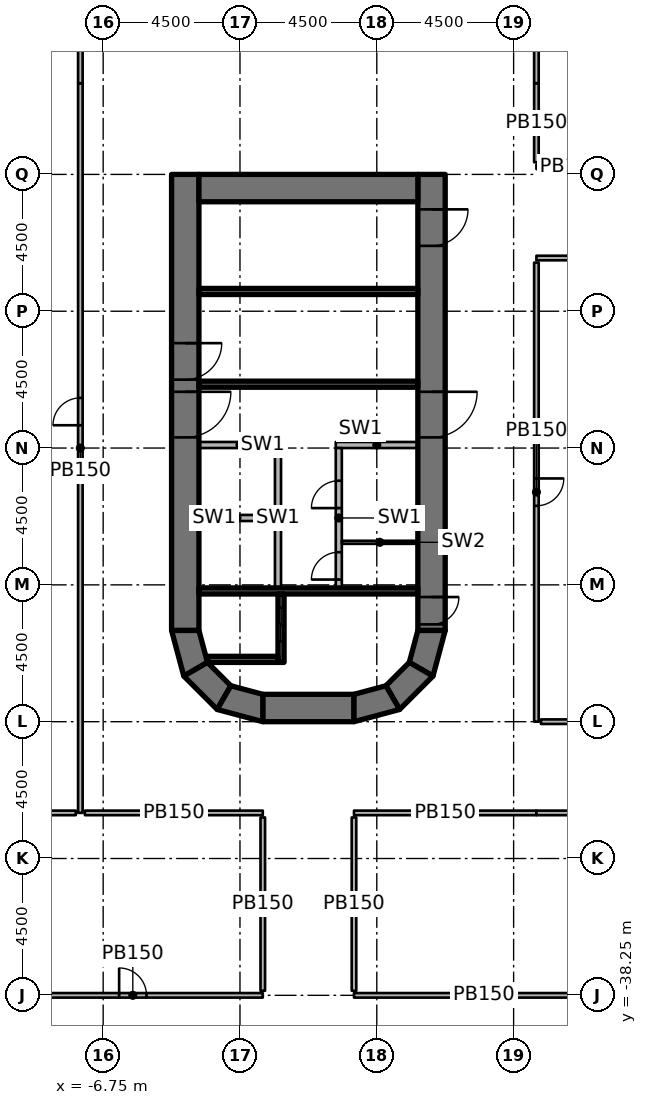
"""IFC4 building model, lengths in metres.
Left out: names, types, materials, properties, quantities, classifications, styles, units other than length and angle.
Written with IfcOpenShell. Run it as: python <this file> out.ifc"""

import sys

from ifc_helpers import new_model, si_unit, direction, frame, frame_2d, origin, origin_2d, place, context, subcontext, project, spatial, polyline, rectangle, outline, extrude, element, fill, save


model = new_model("IFC4")
c1 = context("Model", 3, precision=1e-05, world=origin(), true_north=direction((0.0, 1.0)))
c2 = subcontext(c1, "Body", "Model", "MODEL_VIEW")
j1 = project(units=[si_unit("LENGTHUNIT", "METRE"), si_unit("PLANEANGLEUNIT", "RADIAN")], contexts=[c1])
p1 = place(None, origin())
s1 = spatial("IfcSite", under=j1, at=p1, CompositionType="ELEMENT")
p2 = place(p1, origin())
s2 = spatial("IfcBuilding", under=s1, at=p2, CompositionType="ELEMENT")
p3 = place(p2, frame((0.0, 0.0, 7.0)))
s3 = spatial("IfcBuildingStorey", under=s2, at=p3, CompositionType="ELEMENT", Elevation=7.0)
for number, where, z_axis, x_axis in (
    (1, (-6.25, -26.9, 0.0), (0.0, 0.0, 1.0), (1.0, 0.0, 0.0)),
    (2, (-6.25, -24.65, 0.0), (0.0, 0.0, 1.0), (1.0, 0.0, 0.0)),
    (3, (-6.25, -20.25, 0.0), (0.0, 0.0, 1.0), (1.0, 0.0, 0.0)),
    (4, (-6.25, -15.75, 0.0), (0.0, 0.0, 1.0), (1.0, 0.0, 0.0)),
    (5, (-6.25, -10.75, 0.0), (0.0, 0.0, 1.0), (1.0, 0.0, 0.0)),
    (6, (-2.25, -33.11, 0.0), (0.0, 0.0, 1.0), (1.0, 0.0, 0.0)),
    (7, (2.25, -33.11, 0.0), (0.0, 0.0, 1.0), (1.0, 0.0, 0.0)),
    (8, (6.25, -26.9, 0.0), (0.0, 0.0, 1.0), (1.0, 0.0, 0.0)),
    (9, (6.25, -24.65, 0.0), (0.0, 0.0, 1.0), (1.0, 0.0, 0.0)),
    (10, (6.25, -20.25, 0.0), (0.0, 0.0, 1.0), (1.0, 0.0, 0.0)),
    (11, (6.25, -15.75, 0.0), (0.0, 0.0, 1.0), (1.0, 0.0, 0.0)),
    (12, (6.25, -10.75, 0.0), (0.0, 0.0, 1.0), (1.0, 0.0, 0.0)),
):
    element("IfcColumn", number, at=place(p3, frame(where, z_axis=z_axis, x_axis=x_axis)), inside=s3, PredefinedType="COLUMN", context=c2, shape_type="SweptSolid", body=[
        extrude(rectangle(XDim=1.2, YDim=1.2, at=origin_2d()), origin(), (0.0, 0.0, 1.0), 4.55),
    ])
p4 = place(p3, frame((-4.05, -11.25, 0.0), z_axis=(0.0, 0.0, 1.0), x_axis=(0.0, -1.0, 0.0)))
e13 = element("IfcWall", 13, at=p4, inside=s3, PredefinedType="SHEAR", context=c2, shape_type="SweptSolid", body=[
    extrude(rectangle(XDim=15.0, YDim=0.9, at=frame_2d((7.5, 0.0))), origin(), (0.0, 0.0, 1.0), 5.0),
])
p5 = place(p4, frame((7.15, 0.0, 0.0)))
e14 = element("IfcOpeningElement", 14, at=p5, cuts=e13, PredefinedType="OPENING", context=c2, shape_type="SweptSolid", body=[
    extrude(rectangle(XDim=1.5, YDim=2.3, at=frame_2d((0.75, 1.15))), frame((0.0, 0.46, 0.0), z_axis=(0.0, -1.0, 0.0), x_axis=(1.0, 0.0, 0.0)), (0.0, 0.0, 1.0), 0.92),
])
p6 = place(p4, frame((5.55, 0.0, 0.0)))
e15 = element("IfcOpeningElement", 15, at=p6, cuts=e13, PredefinedType="OPENING", context=c2, shape_type="SweptSolid", body=[
    extrude(rectangle(XDim=1.2, YDim=2.1, at=frame_2d((0.6, 1.05))), frame((0.0, 0.46, 0.0), z_axis=(0.0, -1.0, 0.0), x_axis=(1.0, 0.0, 0.0)), (0.0, 0.0, 1.0), 0.92),
])
p7 = place(p3, frame((4.05, -11.25, 0.0), z_axis=(0.0, 0.0, 1.0), x_axis=(0.0, -1.0, 0.0)))
e16 = element("IfcWall", 16, at=p7, inside=s3, PredefinedType="SHEAR", context=c2, shape_type="SweptSolid", body=[
    extrude(rectangle(XDim=15.0, YDim=0.9, at=frame_2d((7.5, 0.0))), origin(), (0.0, 0.0, 1.0), 5.0),
])
p8 = place(p7, frame((7.15, 0.0, 0.0)))
e17 = element("IfcOpeningElement", 17, at=p8, cuts=e16, PredefinedType="OPENING", context=c2, shape_type="SweptSolid", body=[
    extrude(rectangle(XDim=1.5, YDim=2.3, at=frame_2d((0.75, 1.15))), frame((0.0, 0.46, 0.0), z_axis=(0.0, -1.0, 0.0), x_axis=(1.0, 0.0, 0.0)), (0.0, 0.0, 1.0), 0.92),
])
p9 = place(p7, frame((13.9, 0.0, 0.0)))
e18 = element("IfcOpeningElement", 18, at=p9, cuts=e16, PredefinedType="OPENING", context=c2, shape_type="SweptSolid", body=[
    extrude(rectangle(XDim=0.9, YDim=2.1, at=frame_2d((0.45, 1.05))), frame((0.0, 0.46, 0.0), z_axis=(0.0, -1.0, 0.0), x_axis=(1.0, 0.0, 0.0)), (0.0, 0.0, 1.0), 0.92),
])
p10 = place(p7, frame((1.15, 0.0, 0.0)))
e19 = element("IfcOpeningElement", 19, at=p10, cuts=e16, PredefinedType="OPENING", context=c2, shape_type="SweptSolid", body=[
    extrude(rectangle(XDim=1.2, YDim=2.1, at=frame_2d((0.6, 1.05))), frame((0.0, 0.46, 0.0), z_axis=(0.0, -1.0, 0.0), x_axis=(1.0, 0.0, 0.0)), (0.0, 0.0, 1.0), 0.92),
])
p11 = place(p3, frame((-3.6, -11.7, 0.0), z_axis=(0.0, 0.0, 1.0), x_axis=(1.0, 0.0, 0.0)))
e20 = element("IfcWall", 20, at=p11, inside=s3, PredefinedType="SHEAR", context=c2, shape_type="SweptSolid", body=[
    extrude(rectangle(XDim=7.2, YDim=0.9, at=frame_2d((3.6, 0.0))), origin(), (0.0, 0.0, 1.0), 5.0),
])
p12 = place(p3, frame((-1.5, -28.8, 0.0), z_axis=(0.0, 0.0, 1.0), x_axis=(1.0, 0.0, 0.0)))
e21 = element("IfcWall", 21, at=p12, inside=s3, PredefinedType="SHEAR", context=c2, shape_type="SweptSolid", body=[
    extrude(rectangle(XDim=3.0, YDim=0.9, at=frame_2d((1.5, 0.0))), origin(), (0.0, 0.0, 1.0), 5.0),
])
p13 = place(p3, origin())
e22 = element("IfcWall", 22, at=p13, inside=s3, PredefinedType="SHEAR", context=c2, shape_type="SweptSolid", body=[
    extrude(outline(polyline([(-4.5, -26.25), (-4.098, -27.75), (-3.319, -27.3), (-3.6, -26.25), (-4.5, -26.25)])), origin(), (0.0, 0.0, 1.0), 5.0),
])
p14 = place(p3, origin())
e23 = element("IfcWall", 23, at=p14, inside=s3, PredefinedType="SHEAR", context=c2, shape_type="SweptSolid", body=[
    extrude(outline(polyline([(-4.098, -27.75), (-3.0, -28.848), (-2.55, -28.069), (-3.319, -27.3), (-4.098, -27.75)])), origin(), (0.0, 0.0, 1.0), 5.0),
])
p15 = place(p3, origin())
e24 = element("IfcWall", 24, at=p15, inside=s3, PredefinedType="SHEAR", context=c2, shape_type="SweptSolid", body=[
    extrude(outline(polyline([(-3.0, -28.848), (-1.5, -29.25), (-1.5, -28.35), (-2.55, -28.069), (-3.0, -28.848)])), origin(), (0.0, 0.0, 1.0), 5.0),
])
p16 = place(p3, origin())
e25 = element("IfcWall", 25, at=p16, inside=s3, PredefinedType="SHEAR", context=c2, shape_type="SweptSolid", body=[
    extrude(outline(polyline([(4.5, -26.25), (4.098, -27.75), (3.319, -27.3), (3.6, -26.25), (4.5, -26.25)])), origin(), (0.0, 0.0, 1.0), 5.0),
])
p17 = place(p3, origin())
e26 = element("IfcWall", 26, at=p17, inside=s3, PredefinedType="SHEAR", context=c2, shape_type="SweptSolid", body=[
    extrude(outline(polyline([(4.098, -27.75), (3.0, -28.848), (2.55, -28.069), (3.319, -27.3), (4.098, -27.75)])), origin(), (0.0, 0.0, 1.0), 5.0),
])
p18 = place(p3, origin())
e27 = element("IfcWall", 27, at=p18, inside=s3, PredefinedType="SHEAR", context=c2, shape_type="SweptSolid", body=[
    extrude(outline(polyline([(3.0, -28.848), (1.5, -29.25), (1.5, -28.35), (2.55, -28.069), (3.0, -28.848)])), origin(), (0.0, 0.0, 1.0), 5.0),
])
p19 = place(p3, frame((3.6, -24.95, 0.0), z_axis=(0.0, 0.0, 1.0), x_axis=(-1.0, 0.0, 0.0)))
e28 = element("IfcWall", 28, at=p19, inside=s3, PredefinedType="SHEAR", context=c2, shape_type="SweptSolid", body=[
    extrude(rectangle(XDim=7.2, YDim=0.2, at=frame_2d((3.6, 0.0))), origin(), (0.0, 0.0, 1.0), 4.55),
])
p20 = place(p3, frame((-0.9, -27.3, 0.0), z_axis=(0.0, 0.0, 1.0), x_axis=(0.0, 1.0, 0.0)))
e29 = element("IfcWall", 29, at=p20, inside=s3, PredefinedType="SHEAR", context=c2, shape_type="SweptSolid", body=[
    extrude(rectangle(XDim=2.25, YDim=0.2, at=frame_2d((1.125, 0.0))), origin(), (0.0, 0.0, 1.0), 4.55),
])
p21 = place(p20, frame((0.7, 0.0, 0.0)))
e30 = element("IfcOpeningElement", 30, at=p21, cuts=e29, PredefinedType="OPENING", context=c2, shape_type="SweptSolid", body=[
    extrude(rectangle(XDim=1.1, YDim=2.3, at=frame_2d((0.55, 1.15))), frame((0.0, 0.11, 0.0), z_axis=(0.0, -1.0, 0.0), x_axis=(1.0, 0.0, 0.0)), (0.0, 0.0, 1.0), 0.22),
])
p22 = place(p3, origin())
e31 = element("IfcWall", 31, at=p22, inside=s3, PredefinedType="SHEAR", context=c2, shape_type="SweptSolid", body=[
    extrude(outline(polyline([(-1.0, -27.1), (-3.341, -27.1), (-3.291, -27.284), (-3.275, -27.3), (-1.0, -27.3), (-1.0, -27.1)])), origin(), (0.0, 0.0, 1.0), 4.55),
])
for number, where, z_axis, x_axis in (
    (32, (3.6, -18.15, 0.0), (0.0, 0.0, 1.0), (-1.0, 0.0, 0.0)),
    (33, (3.6, -15.1, 0.0), (0.0, 0.0, 1.0), (-1.0, 0.0, 0.0)),
):
    element("IfcWall", number, at=place(p3, frame(where, z_axis=z_axis, x_axis=x_axis)), inside=s3, PredefinedType="SHEAR", context=c2, shape_type="SweptSolid", body=[
        extrude(rectangle(XDim=7.2, YDim=0.2, at=frame_2d((3.6, 0.0))), origin(), (0.0, 0.0, 1.0), 4.55),
    ])
p23 = place(p3, frame((3.6, -20.15, 0.0), z_axis=(0.0, 0.0, 1.0), x_axis=(-1.0, 0.0, 0.0)))
e34 = element("IfcWall", 34, at=p23, inside=s3, PredefinedType="PARTITIONING", context=c2, shape_type="SweptSolid", body=[
    extrude(rectangle(XDim=2.7, YDim=0.2, at=frame_2d((1.35, 0.0))), origin(), (0.0, 0.0, 1.0), 4.55),
])
p24 = place(p3, frame((1.0, -24.85, 0.0), z_axis=(0.0, 0.0, 1.0), x_axis=(0.0, 1.0, 0.0)))
e35 = element("IfcWall", 35, at=p24, inside=s3, PredefinedType="PARTITIONING", context=c2, shape_type="SweptSolid", body=[
    extrude(rectangle(XDim=4.6, YDim=0.2, at=frame_2d((2.3, 0.0))), origin(), (0.0, 0.0, 1.0), 4.55),
])
p25 = place(p24, frame((0.275, 0.0, 0.0)))
e36 = element("IfcOpeningElement", 36, at=p25, cuts=e35, PredefinedType="OPENING", context=c2, shape_type="SweptSolid", body=[
    extrude(rectangle(XDim=0.9, YDim=2.1, at=frame_2d((0.45, 1.05))), frame((0.0, 0.11, 0.0), z_axis=(0.0, -1.0, 0.0), x_axis=(1.0, 0.0, 0.0)), (0.0, 0.0, 1.0), 0.22),
])
p26 = place(p24, frame((2.625, 0.0, 0.0)))
e37 = element("IfcOpeningElement", 37, at=p26, cuts=e35, PredefinedType="OPENING", context=c2, shape_type="SweptSolid", body=[
    extrude(rectangle(XDim=0.9, YDim=2.1, at=frame_2d((0.45, 1.05))), frame((0.0, 0.11, 0.0), z_axis=(0.0, -1.0, 0.0), x_axis=(1.0, 0.0, 0.0)), (0.0, 0.0, 1.0), 0.22),
])
p27 = place(p3, frame((-0.9, -20.15, 0.0), z_axis=(0.0, 0.0, 1.0), x_axis=(-1.0, 0.0, 0.0)))
e38 = element("IfcWall", 38, at=p27, inside=s3, PredefinedType="PARTITIONING", context=c2, shape_type="SweptSolid", body=[
    extrude(rectangle(XDim=2.7, YDim=0.2, at=frame_2d((1.35, 0.0))), origin(), (0.0, 0.0, 1.0), 4.55),
])
p28 = place(p3, frame((-1.0, -24.85, 0.0), z_axis=(0.0, 0.0, 1.0), x_axis=(0.0, 1.0, 0.0)))
e39 = element("IfcWall", 39, at=p28, inside=s3, PredefinedType="PARTITIONING", context=c2, shape_type="SweptSolid", body=[
    extrude(rectangle(XDim=4.6, YDim=0.2, at=frame_2d((2.3, 0.0))), origin(), (0.0, 0.0, 1.0), 4.55),
])
p29 = place(p3, frame((3.6, -23.35, 0.0), z_axis=(0.0, 0.0, 1.0), x_axis=(-1.0, 0.0, 0.0)))
e40 = element("IfcWall", 40, at=p29, inside=s3, PredefinedType="PARTITIONING", context=c2, shape_type="SweptSolid", body=[
    extrude(rectangle(XDim=2.5, YDim=0.1, at=frame_2d((1.25, 0.0))), origin(), (0.0, 0.0, 1.0), 4.55),
])
p30 = place(p3, frame((-1.1, -22.55, 0.0), z_axis=(0.0, 0.0, 1.0), x_axis=(-1.0, 0.0, 0.0)))
e41 = element("IfcWall", 41, at=p30, inside=s3, PredefinedType="PARTITIONING", context=c2, shape_type="SweptSolid", body=[
    extrude(rectangle(XDim=2.5, YDim=0.2, at=frame_2d((1.25, 0.0))), origin(), (0.0, 0.0, 1.0), 4.55),
])
p31 = place(p3, frame((1.5, -38.25, 0.0), z_axis=(0.0, 0.0, 1.0), x_axis=(1.0, 0.0, 0.0)))
e42 = element("IfcWall", 42, at=p31, inside=s3, PredefinedType="PARTITIONING", context=c2, shape_type="SweptSolid", body=[
    extrude(rectangle(XDim=8.55, YDim=0.15, at=frame_2d((4.275, 0.0))), origin(), (0.0, 0.0, 1.0), 4.55),
])
p32 = place(p3, frame((-10.05, -38.25, 0.0), z_axis=(0.0, 0.0, 1.0), x_axis=(1.0, 0.0, 0.0)))
e43 = element("IfcWall", 43, at=p32, inside=s3, PredefinedType="PARTITIONING", context=c2, shape_type="SweptSolid", body=[
    extrude(rectangle(XDim=8.55, YDim=0.15, at=frame_2d((4.275, 0.0))), origin(), (0.0, 0.0, 1.0), 4.55),
])
p33 = place(p32, frame((3.825, 0.0, 0.0)))
e44 = element("IfcOpeningElement", 44, at=p33, cuts=e43, PredefinedType="OPENING", context=c2, shape_type="SweptSolid", body=[
    extrude(rectangle(XDim=0.9, YDim=2.1, at=frame_2d((0.45, 1.05))), frame((0.0, 0.085, 0.0), z_axis=(0.0, -1.0, 0.0), x_axis=(1.0, 0.0, 0.0)), (0.0, 0.0, 1.0), 0.17),
])
p34 = place(p3, frame((7.5, -11.0, 0.0), z_axis=(0.0, 0.0, 1.0), x_axis=(1.0, 0.0, 0.0)))
e45 = element("IfcWall", 45, at=p34, inside=s3, PredefinedType="PARTITIONING", context=c2, shape_type="SweptSolid", body=[
    extrude(rectangle(XDim=2.25, YDim=0.15, at=frame_2d((1.125, 0.0))), origin(), (0.0, 0.0, 1.0), 4.55),
])
p35 = place(p3, frame((16.5, -14.0, 0.0), z_axis=(0.0, 0.0, 1.0), x_axis=(-1.0, 0.0, 0.0)))
e46 = element("IfcWall", 46, at=p35, inside=s3, PredefinedType="PARTITIONING", context=c2, shape_type="SweptSolid", body=[
    extrude(rectangle(XDim=9.0, YDim=0.15, at=frame_2d((4.5, 0.0))), origin(), (0.0, 0.0, 1.0), 4.55),
])
p36 = place(p3, frame((7.5, -10.85, 0.0), z_axis=(0.0, 0.0, 1.0), x_axis=(0.0, 1.0, 0.0)))
e47 = element("IfcWall", 47, at=p36, inside=s3, PredefinedType="PARTITIONING", context=c2, shape_type="SweptSolid", body=[
    extrude(rectangle(XDim=2.6, YDim=0.15, at=frame_2d((1.3, 0.0))), origin(), (0.0, 0.0, 1.0), 4.55),
])
p37 = place(p3, frame((7.5, -1.65, 0.0), z_axis=(0.0, 0.0, 1.0), x_axis=(0.0, -1.0, 0.0)))
e48 = element("IfcWall", 48, at=p37, inside=s3, PredefinedType="PARTITIONING", context=c2, shape_type="SweptSolid", body=[
    extrude(rectangle(XDim=6.6, YDim=0.15, at=frame_2d((3.3, 0.0))), origin(), (0.0, 0.0, 1.0), 4.55),
])
p38 = place(p37, frame((2.85, 0.0, 0.0)))
e49 = element("IfcOpeningElement", 49, at=p38, cuts=e48, PredefinedType="OPENING", context=c2, shape_type="SweptSolid", body=[
    extrude(rectangle(XDim=0.9, YDim=2.1, at=frame_2d((0.45, 1.05))), frame((0.0, 0.085, 0.0), z_axis=(0.0, -1.0, 0.0), x_axis=(1.0, 0.0, 0.0)), (0.0, 0.0, 1.0), 0.17),
])
p39 = place(p3, frame((7.5, -14.15, 0.0), z_axis=(0.0, 0.0, 1.0), x_axis=(0.0, -1.0, 0.0)))
e50 = element("IfcWall", 50, at=p39, inside=s3, PredefinedType="PARTITIONING", context=c2, shape_type="SweptSolid", body=[
    extrude(rectangle(XDim=15.1, YDim=0.15, at=frame_2d((7.55, 0.0))), origin(), (0.0, 0.0, 1.0), 4.55),
])
p40 = place(p39, frame((7.1, 0.0, 0.0)))
e51 = element("IfcOpeningElement", 51, at=p40, cuts=e50, PredefinedType="OPENING", context=c2, shape_type="SweptSolid", body=[
    extrude(rectangle(XDim=0.9, YDim=2.1, at=frame_2d((0.45, 1.05))), frame((0.0, 0.085, 0.0), z_axis=(0.0, -1.0, 0.0), x_axis=(1.0, 0.0, 0.0)), (0.0, 0.0, 1.0), 0.17),
])
p41 = place(p3, frame((16.35, -29.25, 0.0), z_axis=(0.0, 0.0, 1.0), x_axis=(-1.0, 0.0, 0.0)))
e52 = element("IfcWall", 52, at=p41, inside=s3, PredefinedType="PARTITIONING", context=c2, shape_type="SweptSolid", body=[
    extrude(rectangle(XDim=8.7, YDim=0.15, at=frame_2d((4.35, 0.0))), origin(), (0.0, 0.0, 1.0), 4.55),
])
p42 = place(p3, frame((7.5, -32.25, 0.0), z_axis=(0.0, 0.0, 1.0), x_axis=(-1.0, 0.0, 0.0)))
e53 = element("IfcWall", 53, at=p42, inside=s3, PredefinedType="PARTITIONING", context=c2, shape_type="SweptSolid", body=[
    extrude(rectangle(XDim=6.0, YDim=0.15, at=frame_2d((3.0, 0.0))), origin(), (0.0, 0.0, 1.0), 4.55),
])
p43 = place(p3, frame((-7.5, -32.25, 0.0), z_axis=(0.0, 0.0, 1.0), x_axis=(0.0, 1.0, 0.0)))
e54 = element("IfcWall", 54, at=p43, inside=s3, PredefinedType="PARTITIONING", context=c2, shape_type="SweptSolid", body=[
    extrude(rectangle(XDim=24.0, YDim=0.15, at=frame_2d((12.0, 0.0))), origin(), (0.0, 0.0, 1.0), 4.55),
])
p44 = place(p43, frame((12.75, 0.0, 0.0)))
e55 = element("IfcOpeningElement", 55, at=p44, cuts=e54, PredefinedType="OPENING", context=c2, shape_type="SweptSolid", body=[
    extrude(rectangle(XDim=0.9, YDim=2.1, at=frame_2d((0.45, 1.05))), frame((0.0, 0.085, 0.0), z_axis=(0.0, -1.0, 0.0), x_axis=(1.0, 0.0, 0.0)), (0.0, 0.0, 1.0), 0.17),
])
p45 = place(p3, frame((-1.5, -32.25, 0.0), z_axis=(0.0, 0.0, 1.0), x_axis=(-1.0, 0.0, 0.0)))
e56 = element("IfcWall", 56, at=p45, inside=s3, PredefinedType="PARTITIONING", context=c2, shape_type="SweptSolid", body=[
    extrude(rectangle(XDim=5.85, YDim=0.15, at=frame_2d((2.925, 0.0))), origin(), (0.0, 0.0, 1.0), 4.55),
])
for number, where, z_axis, x_axis in (
    (57, (1.5, -32.4, 0.0), (0.0, 0.0, 1.0), (0.0, -1.0, 0.0)),
    (58, (-1.5, -38.1, 0.0), (0.0, 0.0, 1.0), (0.0, 1.0, 0.0)),
):
    element("IfcWall", number, at=place(p3, frame(where, z_axis=z_axis, x_axis=x_axis)), inside=s3, PredefinedType="PARTITIONING", context=c2, shape_type="SweptSolid", body=[
        extrude(rectangle(XDim=5.7, YDim=0.15, at=frame_2d((2.85, 0.0))), origin(), (0.0, 0.0, 1.0), 4.55),
    ])
p46 = place(p3, frame((24.15, -32.25, 0.0), z_axis=(0.0, 0.0, 1.0), x_axis=(-1.0, 0.0, 0.0)))
e59 = element("IfcWall", 59, at=p46, inside=s3, PredefinedType="PARTITIONING", context=c2, shape_type="SweptSolid", body=[
    extrude(rectangle(XDim=16.65, YDim=0.15, at=frame_2d((8.325, 0.0))), origin(), (0.0, 0.0, 1.0), 4.55),
])
p47 = place(p46, frame((7.575, 0.0, 0.0)))
e60 = element("IfcOpeningElement", 60, at=p47, cuts=e59, PredefinedType="OPENING", context=c2, shape_type="SweptSolid", body=[
    extrude(rectangle(XDim=0.9, YDim=2.1, at=frame_2d((0.45, 1.05))), frame((0.0, 0.085, 0.0), z_axis=(0.0, -1.0, 0.0), x_axis=(1.0, 0.0, 0.0)), (0.0, 0.0, 1.0), 0.17),
])
p48 = place(p3, frame((-7.65, -32.25, 0.0), z_axis=(0.0, 0.0, 1.0), x_axis=(-1.0, 0.0, 0.0)))
e61 = element("IfcWall", 61, at=p48, inside=s3, PredefinedType="PARTITIONING", context=c2, shape_type="SweptSolid", body=[
    extrude(rectangle(XDim=16.5, YDim=0.15, at=frame_2d((8.25, 0.0))), origin(), (0.0, 0.0, 1.0), 4.55),
])
p49 = place(p3, frame((-7.5, -1.65, 0.0), z_axis=(0.0, 0.0, 1.0), x_axis=(0.0, -1.0, 0.0)))
e62 = element("IfcWall", 62, at=p49, inside=s3, PredefinedType="PARTITIONING", context=c2, shape_type="SweptSolid", body=[
    extrude(rectangle(XDim=6.6, YDim=0.15, at=frame_2d((3.3, 0.0))), origin(), (0.0, 0.0, 1.0), 4.55),
])
p50 = place(p8, origin())
e63 = element("IfcDoor", 63, at=p50, inside=s3, OperationType="DOUBLE_DOOR_SINGLE_SWING", PredefinedType="DOOR", context=c2, shape_type="SweptSolid", body=[
    extrude(rectangle(XDim=1.5, YDim=2.3, at=frame_2d((0.75, 1.15))), frame((0.0, 0.025, 0.0), z_axis=(0.0, -1.0, 0.0), x_axis=(1.0, 0.0, 0.0)), (0.0, 0.0, 1.0), 0.05),
])
fill(e17, e63)
p51 = place(p5, origin())
e64 = element("IfcDoor", 64, at=p51, inside=s3, OperationType="DOUBLE_DOOR_SINGLE_SWING", PredefinedType="DOOR", context=c2, shape_type="SweptSolid", body=[
    extrude(rectangle(XDim=1.5, YDim=2.3, at=frame_2d((0.75, 1.15))), frame((0.0, 0.025, 0.0), z_axis=(0.0, -1.0, 0.0), x_axis=(1.0, 0.0, 0.0)), (0.0, 0.0, 1.0), 0.05),
])
fill(e14, e64)
p52 = place(p9, origin())
e65 = element("IfcDoor", 65, at=p52, inside=s3, OperationType="SINGLE_SWING_LEFT", PredefinedType="DOOR", context=c2, shape_type="SweptSolid", body=[
    extrude(rectangle(XDim=0.9, YDim=2.1, at=frame_2d((0.45, 1.05))), frame((0.0, 0.025, 0.0), z_axis=(0.0, -1.0, 0.0), x_axis=(1.0, 0.0, 0.0)), (0.0, 0.0, 1.0), 0.05),
])
fill(e18, e65)
p53 = place(p6, origin())
e66 = element("IfcDoor", 66, at=p53, inside=s3, OperationType="SINGLE_SWING_RIGHT", PredefinedType="DOOR", context=c2, shape_type="SweptSolid", body=[
    extrude(rectangle(XDim=1.2, YDim=2.1, at=frame_2d((0.6, 1.05))), frame((0.0, 0.025, 0.0), z_axis=(0.0, -1.0, 0.0), x_axis=(1.0, 0.0, 0.0)), (0.0, 0.0, 1.0), 0.05),
])
fill(e15, e66)
p54 = place(p10, origin())
e67 = element("IfcDoor", 67, at=p54, inside=s3, OperationType="SINGLE_SWING_RIGHT", PredefinedType="DOOR", context=c2, shape_type="SweptSolid", body=[
    extrude(rectangle(XDim=1.2, YDim=2.1, at=frame_2d((0.6, 1.05))), frame((0.0, 0.025, 0.0), z_axis=(0.0, -1.0, 0.0), x_axis=(1.0, 0.0, 0.0)), (0.0, 0.0, 1.0), 0.05),
])
fill(e19, e67)
p55 = place(p21, origin())
e68 = element("IfcDoor", 68, at=p55, inside=s3, OperationType="DOUBLE_DOOR_SLIDING", PredefinedType="DOOR", context=c2, shape_type="SweptSolid", body=[
    extrude(rectangle(XDim=1.1, YDim=2.3, at=frame_2d((0.55, 1.15))), frame((0.0, 0.025, 0.0), z_axis=(0.0, -1.0, 0.0), x_axis=(1.0, 0.0, 0.0)), (0.0, 0.0, 1.0), 0.05),
])
fill(e30, e68)
p56 = place(p25, origin())
e69 = element("IfcDoor", 69, at=p56, inside=s3, OperationType="SINGLE_SWING_RIGHT", PredefinedType="DOOR", context=c2, shape_type="SweptSolid", body=[
    extrude(rectangle(XDim=0.9, YDim=2.1, at=frame_2d((0.45, 1.05))), frame((0.0, 0.025, 0.0), z_axis=(0.0, -1.0, 0.0), x_axis=(1.0, 0.0, 0.0)), (0.0, 0.0, 1.0), 0.05),
])
fill(e36, e69)
p57 = place(p26, origin())
e70 = element("IfcDoor", 70, at=p57, inside=s3, OperationType="SINGLE_SWING_LEFT", PredefinedType="DOOR", context=c2, shape_type="SweptSolid", body=[
    extrude(rectangle(XDim=0.9, YDim=2.1, at=frame_2d((0.45, 1.05))), frame((0.0, 0.025, 0.0), z_axis=(0.0, -1.0, 0.0), x_axis=(1.0, 0.0, 0.0)), (0.0, 0.0, 1.0), 0.05),
])
fill(e37, e70)
p58 = place(p33, origin())
e71 = element("IfcDoor", 71, at=p58, inside=s3, OperationType="SINGLE_SWING_LEFT", PredefinedType="DOOR", context=c2, shape_type="SweptSolid", body=[
    extrude(rectangle(XDim=0.9, YDim=2.1, at=frame_2d((0.45, 1.05))), frame((0.0, 0.025, 0.0), z_axis=(0.0, -1.0, 0.0), x_axis=(1.0, 0.0, 0.0)), (0.0, 0.0, 1.0), 0.05),
])
fill(e44, e71)
p59 = place(p40, origin())
e72 = element("IfcDoor", 72, at=p59, inside=s3, OperationType="SINGLE_SWING_LEFT", PredefinedType="DOOR", context=c2, shape_type="SweptSolid", body=[
    extrude(rectangle(XDim=0.9, YDim=2.1, at=frame_2d((0.45, 1.05))), frame((0.0, 0.025, 0.0), z_axis=(0.0, -1.0, 0.0), x_axis=(1.0, 0.0, 0.0)), (0.0, 0.0, 1.0), 0.05),
])
fill(e51, e72)
p60 = place(p44, origin())
e73 = element("IfcDoor", 73, at=p60, inside=s3, OperationType="SINGLE_SWING_LEFT", PredefinedType="DOOR", context=c2, shape_type="SweptSolid", body=[
    extrude(rectangle(XDim=0.9, YDim=2.1, at=frame_2d((0.45, 1.05))), frame((0.0, 0.025, 0.0), z_axis=(0.0, -1.0, 0.0), x_axis=(1.0, 0.0, 0.0)), (0.0, 0.0, 1.0), 0.05),
])
fill(e55, e73)
save(model, sys.argv[1])
